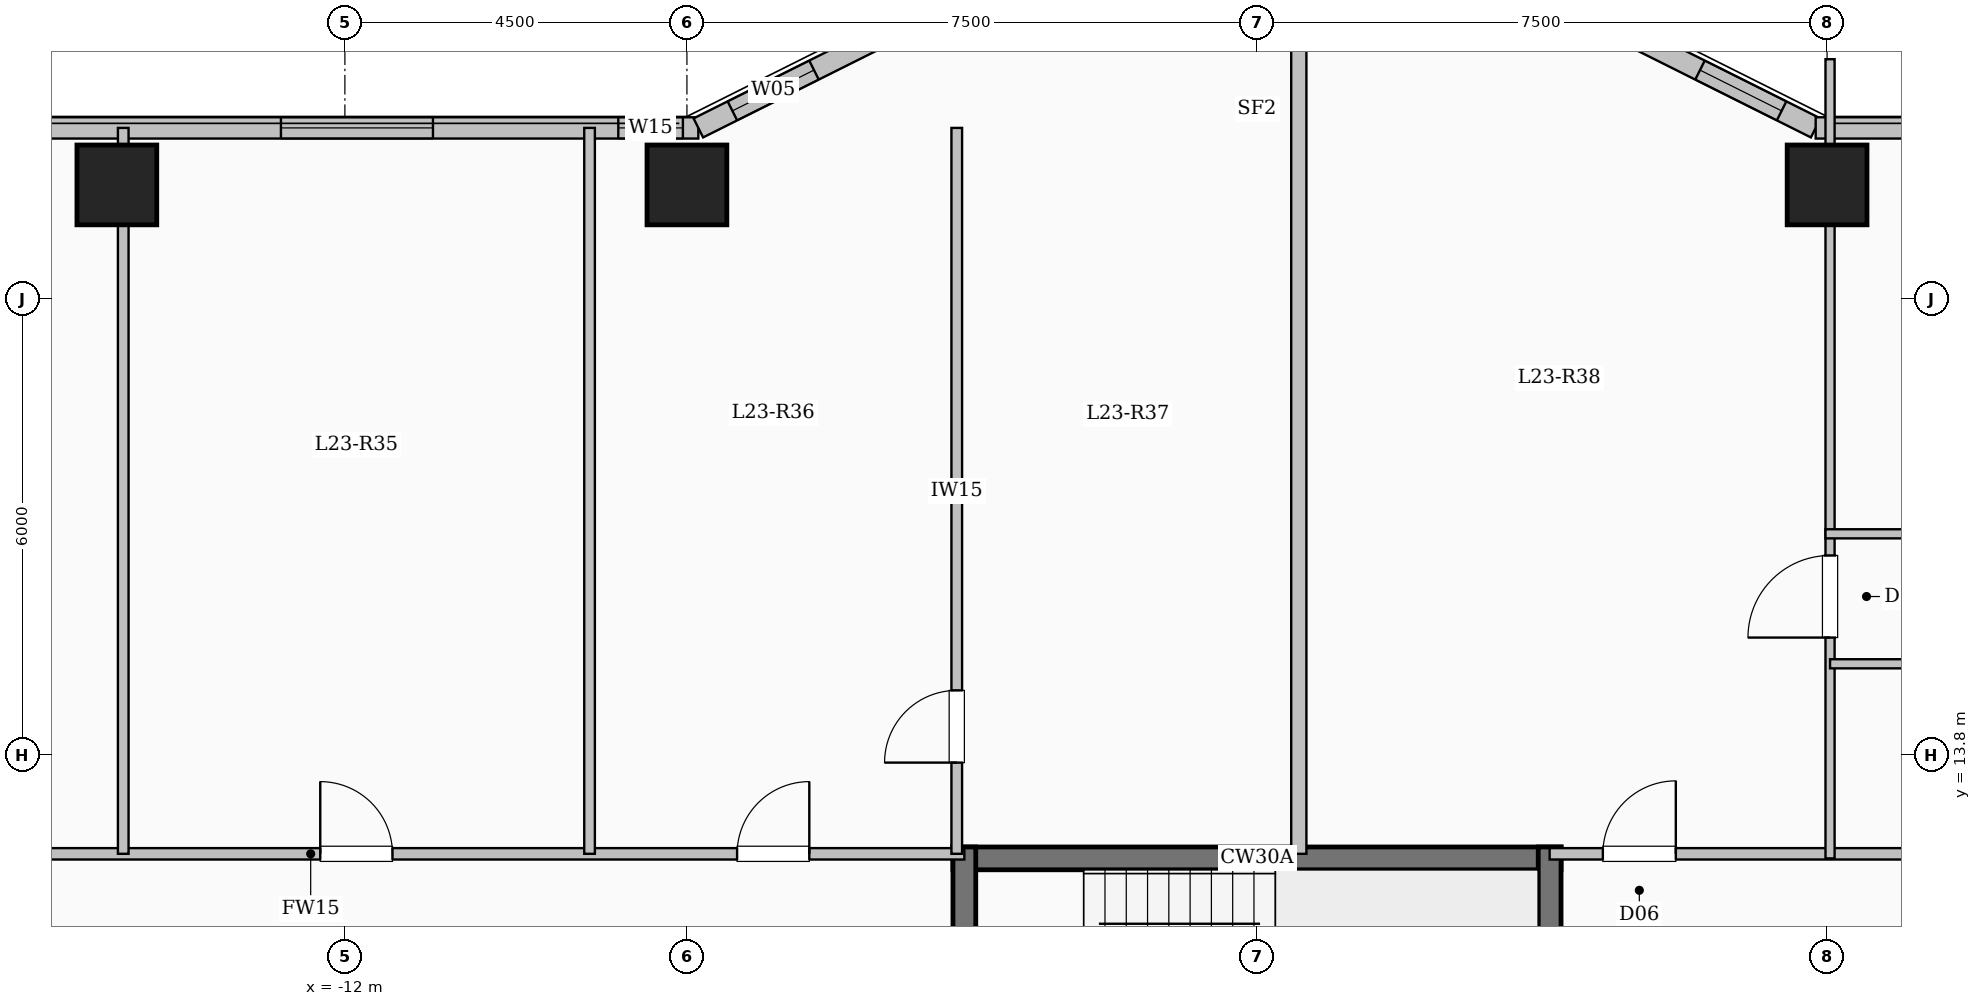
"""IFC4 building model, lengths in metres.
Left out: names, types, materials, properties, quantities, classifications, styles, units other than length and angle.
Written with IfcOpenShell. Run it as: python <this file> out.ifc"""

import sys

from ifc_helpers import new_model, si_unit, direction, frame, frame_2d, origin, origin_2d, place, context, subcontext, project, spatial, rectangle, extrude, element, fill, save


model = new_model("IFC4")
c1 = context("Model", 3, precision=1e-05, world=origin(), true_north=direction((0.0, 1.0)))
c2 = subcontext(c1, "Body", "Model", "MODEL_VIEW")
j1 = project(units=[si_unit("LENGTHUNIT", "METRE"), si_unit("PLANEANGLEUNIT", "RADIAN")], contexts=[c1])
p1 = place(None, origin())
s1 = spatial("IfcSite", under=j1, at=p1, CompositionType="ELEMENT")
p2 = place(p1, origin())
s2 = spatial("IfcBuilding", under=s1, at=p2, CompositionType="ELEMENT")
p3 = place(p2, frame((0.0, 0.0, 88.35)))
s3 = spatial("IfcBuildingStorey", under=s2, at=p3, CompositionType="ELEMENT", Elevation=88.35)
for number, where, z_axis, x_axis in (
    (1, (-15.0, 21.3, 0.0), (0.0, 0.0, 1.0), (1.0, 0.0, 0.0)),
    (2, (-7.5, 21.3, 0.0), (0.0, 0.0, 1.0), (1.0, 0.0, 0.0)),
    (3, (7.5, 21.3, 0.0), (0.0, 0.0, 1.0), (1.0, 0.0, 0.0)),
):
    element("IfcColumn", number, at=place(p3, frame(where, z_axis=z_axis, x_axis=x_axis)), inside=s3, PredefinedType="COLUMN", context=c2, shape_type="SweptSolid", body=[
        extrude(rectangle(XDim=1.05, YDim=1.05, at=origin_2d()), origin(), (0.0, 0.0, 1.0), 3.35),
    ])
p4 = place(p3, frame((-21.15, 22.05, 0.0), z_axis=(0.0, 0.0, 1.0), x_axis=(1.0, 0.0, 0.0)))
e4 = element("IfcWall", 4, at=p4, inside=s3, PredefinedType="SOLIDWALL", context=c2, shape_type="SweptSolid", body=[
    extrude(rectangle(XDim=13.8, YDim=0.28, at=frame_2d((6.9, 0.0))), origin(), (0.0, 0.0, 1.0), 3.1),
])
p5 = place(p4, frame((2.136, 0.0, 0.9)))
e5 = element("IfcOpeningElement", 5, at=p5, cuts=e4, PredefinedType="OPENING", context=c2, shape_type="SweptSolid", body=[
    extrude(rectangle(XDim=2.0, YDim=1.7, at=frame_2d((1.0, 0.85))), frame((0.0, 0.15, 0.0), z_axis=(0.0, -1.0, 0.0), x_axis=(1.0, 0.0, 0.0)), (0.0, 0.0, 1.0), 0.3),
])
p6 = place(p4, frame((8.309, 0.0, 0.9)))
e6 = element("IfcOpeningElement", 6, at=p6, cuts=e4, PredefinedType="OPENING", context=c2, shape_type="SweptSolid", body=[
    extrude(rectangle(XDim=2.0, YDim=1.7, at=frame_2d((1.0, 0.85))), frame((0.0, 0.15, 0.0), z_axis=(0.0, -1.0, 0.0), x_axis=(1.0, 0.0, 0.0)), (0.0, 0.0, 1.0), 0.3),
])
p7 = place(p4, frame((12.747, 0.0, 0.95)))
e7 = element("IfcOpeningElement", 7, at=p7, cuts=e4, PredefinedType="OPENING", context=c2, shape_type="SweptSolid", body=[
    extrude(rectangle(XDim=0.85, YDim=1.5, at=frame_2d((0.425, 0.75))), frame((0.0, 0.15, 0.0), z_axis=(0.0, -1.0, 0.0), x_axis=(1.0, 0.0, 0.0)), (0.0, 0.0, 1.0), 0.3),
])
p8 = place(p3, frame((-7.35, 22.05, 0.0), z_axis=(0.0, 0.0, 1.0), x_axis=(0.894427191, 0.4472135955, 0.0)))
e8 = element("IfcWall", 8, at=p8, inside=s3, PredefinedType="SOLIDWALL", context=c2, shape_type="SweptSolid", body=[
    extrude(rectangle(XDim=3.354, YDim=0.28, at=frame_2d((1.677, 0.0))), origin(), (0.0, 0.0, 1.0), 3.1),
])
p9 = place(p8, frame((0.501, 0.0, 0.95)))
e9 = element("IfcOpeningElement", 9, at=p9, cuts=e8, PredefinedType="OPENING", context=c2, shape_type="SweptSolid", body=[
    extrude(rectangle(XDim=1.2, YDim=1.5, at=frame_2d((0.6, 0.75))), frame((0.0, 0.15, 0.0), z_axis=(0.0, -1.0, 0.0), x_axis=(1.0, 0.0, 0.0)), (0.0, 0.0, 1.0), 0.3),
])
p10 = place(p3, frame((4.35, 23.55, 0.0), z_axis=(0.0, 0.0, 1.0), x_axis=(0.894427191, -0.4472135955, 0.0)))
e10 = element("IfcWall", 10, at=p10, inside=s3, PredefinedType="SOLIDWALL", context=c2, shape_type="SweptSolid", body=[
    extrude(rectangle(XDim=3.354, YDim=0.28, at=frame_2d((1.677, 0.0))), origin(), (0.0, 0.0, 1.0), 3.1),
])
p11 = place(p10, frame((1.653, 0.0, 0.95)))
e11 = element("IfcOpeningElement", 11, at=p11, cuts=e10, PredefinedType="OPENING", context=c2, shape_type="SweptSolid", body=[
    extrude(rectangle(XDim=1.2, YDim=1.5, at=frame_2d((0.6, 0.75))), frame((0.0, 0.15, 0.0), z_axis=(0.0, -1.0, 0.0), x_axis=(1.0, 0.0, 0.0)), (0.0, 0.0, 1.0), 0.3),
])
p12 = place(p3, frame((7.35, 22.05, 0.0), z_axis=(0.0, 0.0, 1.0), x_axis=(1.0, 0.0, 0.0)))
e12 = element("IfcWall", 12, at=p12, inside=s3, PredefinedType="SOLIDWALL", context=c2, shape_type="SweptSolid", body=[
    extrude(rectangle(XDim=13.8, YDim=0.28, at=frame_2d((6.9, 0.0))), origin(), (0.0, 0.0, 1.0), 3.1),
])
p13 = place(p12, frame((1.534, 0.0, 0.9)))
e13 = element("IfcOpeningElement", 13, at=p13, cuts=e12, PredefinedType="OPENING", context=c2, shape_type="SweptSolid", body=[
    extrude(rectangle(XDim=1.8, YDim=1.65, at=frame_2d((0.9, 0.825))), frame((0.0, 0.15, 0.0), z_axis=(0.0, -1.0, 0.0), x_axis=(1.0, 0.0, 0.0)), (0.0, 0.0, 1.0), 0.3),
])
p14 = place(p12, frame((6.025, 0.0, 0.9)))
e14 = element("IfcOpeningElement", 14, at=p14, cuts=e12, PredefinedType="OPENING", context=c2, shape_type="SweptSolid", body=[
    extrude(rectangle(XDim=1.8, YDim=1.65, at=frame_2d((0.9, 0.825))), frame((0.0, 0.15, 0.0), z_axis=(0.0, -1.0, 0.0), x_axis=(1.0, 0.0, 0.0)), (0.0, 0.0, 1.0), 0.3),
])
p15 = place(p12, frame((10.542, 0.0, 0.9)))
e15 = element("IfcOpeningElement", 15, at=p15, cuts=e12, PredefinedType="OPENING", context=c2, shape_type="SweptSolid", body=[
    extrude(rectangle(XDim=1.8, YDim=1.65, at=frame_2d((0.9, 0.825))), frame((0.0, 0.15, 0.0), z_axis=(0.0, -1.0, 0.0), x_axis=(1.0, 0.0, 0.0)), (0.0, 0.0, 1.0), 0.3),
])
p16 = place(p3, frame((-4.0, 12.44, 0.0), z_axis=(0.0, 0.0, 1.0), x_axis=(1.0, 0.0, 0.0)))
e16 = element("IfcWall", 16, at=p16, inside=s3, PredefinedType="SHEAR", context=c2, shape_type="SweptSolid", body=[
    extrude(rectangle(XDim=8.0, YDim=0.3, at=frame_2d((4.0, 0.0))), origin(), (0.0, 0.0, 1.0), 3.35),
])
for number, where, z_axis, x_axis in (
    (17, (-3.85, 9.0, 0.0), (0.0, 0.0, 1.0), (0.0, 1.0, 0.0)),
    (18, (3.85, 9.0, 0.0), (0.0, 0.0, 1.0), (0.0, 1.0, 0.0)),
):
    element("IfcWall", number, at=place(p3, frame(where, z_axis=z_axis, x_axis=x_axis)), inside=s3, PredefinedType="SHEAR", context=c2, shape_type="SweptSolid", body=[
        extrude(rectangle(XDim=3.59, YDim=0.3, at=frame_2d((1.795, 0.0))), origin(), (0.0, 0.0, 1.0), 3.35),
    ])
p17 = place(p3, frame((-21.05, 12.5, 0.0), z_axis=(0.0, 0.0, 1.0), x_axis=(1.0, 0.0, 0.0)))
e19 = element("IfcWall", 19, at=p17, inside=s3, PredefinedType="PARTITIONING", context=c2, shape_type="SweptSolid", body=[
    extrude(rectangle(XDim=17.2, YDim=0.15, at=frame_2d((8.6, 0.0))), origin(), (0.0, 0.0, 1.0), 3.1),
])
p18 = place(p17, frame((2.562, 0.0, 0.0)))
e20 = element("IfcOpeningElement", 20, at=p18, cuts=e19, PredefinedType="OPENING", context=c2, shape_type="SweptSolid", body=[
    extrude(rectangle(XDim=0.95, YDim=2.15, at=frame_2d((0.475, 1.075))), frame((0.0, 0.085, 0.0), z_axis=(0.0, -1.0, 0.0), x_axis=(1.0, 0.0, 0.0)), (0.0, 0.0, 1.0), 0.17),
])
p19 = place(p17, frame((8.726, 0.0, 0.0)))
e21 = element("IfcOpeningElement", 21, at=p19, cuts=e19, PredefinedType="OPENING", context=c2, shape_type="SweptSolid", body=[
    extrude(rectangle(XDim=0.95, YDim=2.15, at=frame_2d((0.475, 1.075))), frame((0.0, 0.085, 0.0), z_axis=(0.0, -1.0, 0.0), x_axis=(1.0, 0.0, 0.0)), (0.0, 0.0, 1.0), 0.17),
])
p20 = place(p17, frame((14.21, 0.0, 0.0)))
e22 = element("IfcOpeningElement", 22, at=p20, cuts=e19, PredefinedType="OPENING", context=c2, shape_type="SweptSolid", body=[
    extrude(rectangle(XDim=0.95, YDim=2.15, at=frame_2d((0.475, 1.075))), frame((0.0, 0.085, 0.0), z_axis=(0.0, -1.0, 0.0), x_axis=(1.0, 0.0, 0.0)), (0.0, 0.0, 1.0), 0.17),
])
p21 = place(p3, frame((3.85, 12.5, 0.0), z_axis=(0.0, 0.0, 1.0), x_axis=(1.0, 0.0, 0.0)))
e23 = element("IfcWall", 23, at=p21, inside=s3, PredefinedType="PARTITIONING", context=c2, shape_type="SweptSolid", body=[
    extrude(rectangle(XDim=17.2, YDim=0.15, at=frame_2d((8.6, 0.0))), origin(), (0.0, 0.0, 1.0), 3.1),
])
p22 = place(p21, frame((0.7, 0.0, 0.0)))
e24 = element("IfcOpeningElement", 24, at=p22, cuts=e23, PredefinedType="OPENING", context=c2, shape_type="SweptSolid", body=[
    extrude(rectangle(XDim=0.96, YDim=2.15, at=frame_2d((0.48, 1.075))), frame((0.0, 0.085, 0.0), z_axis=(0.0, -1.0, 0.0), x_axis=(1.0, 0.0, 0.0)), (0.0, 0.0, 1.0), 0.17),
])
p23 = place(p3, frame((0.55, 12.5, 0.0), z_axis=(0.0, 0.0, 1.0), x_axis=(0.0, 1.0, 0.0)))
e25 = element("IfcWall", 25, at=p23, inside=s3, PredefinedType="SOLIDWALL", context=c2, shape_type="SweptSolid", body=[
    extrude(rectangle(XDim=11.08, YDim=0.2, at=frame_2d((5.54, 0.0))), origin(), (0.0, 0.0, 1.0), 3.1),
])
p24 = place(p3, frame((-3.95, 12.5, 0.0), z_axis=(0.0, 0.0, 1.0), x_axis=(0.0, 1.0, 0.0)))
e26 = element("IfcWall", 26, at=p24, inside=s3, PredefinedType="PARTITIONING", context=c2, shape_type="SweptSolid", body=[
    extrude(rectangle(XDim=9.55, YDim=0.14, at=frame_2d((4.775, 0.0))), origin(), (0.0, 0.0, 1.0), 3.1),
])
p25 = place(p24, frame((1.2, 0.0, 0.0)))
e27 = element("IfcOpeningElement", 27, at=p25, cuts=e26, PredefinedType="OPENING", context=c2, shape_type="SweptSolid", body=[
    extrude(rectangle(XDim=0.95, YDim=2.15, at=frame_2d((0.475, 1.075))), frame((0.0, 0.08, 0.0), z_axis=(0.0, -1.0, 0.0), x_axis=(1.0, 0.0, 0.0)), (0.0, 0.0, 1.0), 0.16),
])
p26 = place(p3, frame((-14.916, 12.5, 0.0), z_axis=(0.0, 0.0, 1.0), x_axis=(0.0, 1.0, 0.0)))
e28 = element("IfcWall", 28, at=p26, inside=s3, PredefinedType="PARTITIONING", context=c2, shape_type="SweptSolid", body=[
    extrude(rectangle(XDim=9.55, YDim=0.14, at=frame_2d((4.775, 0.0))), origin(), (0.0, 0.0, 1.0), 2.435),
])
p27 = place(p3, frame((-8.781, 12.5, 0.0), z_axis=(0.0, 0.0, 1.0), x_axis=(0.0, 1.0, 0.0)))
e29 = element("IfcWall", 29, at=p27, inside=s3, PredefinedType="PARTITIONING", context=c2, shape_type="SweptSolid", body=[
    extrude(rectangle(XDim=9.55, YDim=0.14, at=frame_2d((4.775, 0.0))), origin(), (0.0, 0.0, 1.0), 3.1),
])
p28 = place(p3, frame((7.539, 12.44, 0.0), z_axis=(0.0, 0.0, 1.0), x_axis=(0.0, 1.0, 0.0)))
e30 = element("IfcWall", 30, at=p28, inside=s3, PredefinedType="PARTITIONING", context=c2, shape_type="SweptSolid", body=[
    extrude(rectangle(XDim=10.514, YDim=0.12, at=frame_2d((5.257, 0.0))), origin(), (0.0, 0.0, 1.0), 2.435),
])
p29 = place(p28, frame((2.905, 0.0, 0.0)))
e31 = element("IfcOpeningElement", 31, at=p29, cuts=e30, PredefinedType="OPENING", context=c2, shape_type="SweptSolid", body=[
    extrude(rectangle(XDim=1.08, YDim=2.15, at=frame_2d((0.54, 1.075))), frame((0.0, 0.07, 0.0), z_axis=(0.0, -1.0, 0.0), x_axis=(1.0, 0.0, 0.0)), (0.0, 0.0, 1.0), 0.14),
])
p30 = place(p3, frame((7.539, 15.0, 0.0), z_axis=(0.0, 0.0, 1.0), x_axis=(1.0, 0.0, 0.0)))
e32 = element("IfcWall", 32, at=p30, inside=s3, PredefinedType="PARTITIONING", context=c2, shape_type="SweptSolid", body=[
    extrude(rectangle(XDim=7.129, YDim=0.12, at=frame_2d((3.564, 0.0))), origin(), (0.0, 0.0, 1.0), 3.1),
])
p31 = place(p30, frame((3.124, 0.0, 0.0)))
e33 = element("IfcOpeningElement", 33, at=p31, cuts=e32, PredefinedType="OPENING", context=c2, shape_type="SweptSolid", body=[
    extrude(rectangle(XDim=0.88, YDim=2.1, at=frame_2d((0.44, 1.05))), frame((0.0, 0.07, 0.0), z_axis=(0.0, -1.0, 0.0), x_axis=(1.0, 0.0, 0.0)), (0.0, 0.0, 1.0), 0.14),
])
p32 = place(p3, frame((7.479, 16.71, 0.0), z_axis=(0.0, 0.0, 1.0), x_axis=(1.0, 0.0, 0.0)))
e34 = element("IfcWall", 34, at=p32, inside=s3, PredefinedType="PARTITIONING", context=c2, shape_type="SweptSolid", body=[
    extrude(rectangle(XDim=13.631, YDim=0.12, at=frame_2d((6.815, 0.0))), origin(), (0.0, 0.0, 1.0), 3.1),
])
p33 = place(p32, frame((1.802, 0.0, 0.0)))
e35 = element("IfcOpeningElement", 35, at=p33, cuts=e34, PredefinedType="OPENING", context=c2, shape_type="SweptSolid", body=[
    extrude(rectangle(XDim=0.88, YDim=2.1, at=frame_2d((0.44, 1.05))), frame((0.0, 0.07, 0.0), z_axis=(0.0, -1.0, 0.0), x_axis=(1.0, 0.0, 0.0)), (0.0, 0.0, 1.0), 0.14),
])
p34 = place(p32, frame((6.286, 0.0, 0.0)))
e36 = element("IfcOpeningElement", 36, at=p34, cuts=e34, PredefinedType="OPENING", context=c2, shape_type="SweptSolid", body=[
    extrude(rectangle(XDim=0.88, YDim=2.1, at=frame_2d((0.44, 1.05))), frame((0.0, 0.07, 0.0), z_axis=(0.0, -1.0, 0.0), x_axis=(1.0, 0.0, 0.0)), (0.0, 0.0, 1.0), 0.14),
])
p35 = place(p32, frame((10.769, 0.0, 0.0)))
e37 = element("IfcOpeningElement", 37, at=p35, cuts=e34, PredefinedType="OPENING", context=c2, shape_type="SweptSolid", body=[
    extrude(rectangle(XDim=0.88, YDim=2.1, at=frame_2d((0.44, 1.05))), frame((0.0, 0.07, 0.0), z_axis=(0.0, -1.0, 0.0), x_axis=(1.0, 0.0, 0.0)), (0.0, 0.0, 1.0), 0.14),
])
p36 = place(p6, origin())
e38 = element("IfcWindow", 38, at=p36, inside=s3, PartitioningType="SINGLE_PANEL", PredefinedType="WINDOW", context=c2, shape_type="SweptSolid", body=[
    extrude(rectangle(XDim=2.0, YDim=1.7, at=frame_2d((1.0, 0.85))), frame((0.0, 0.03, 0.0), z_axis=(0.0, -1.0, 0.0), x_axis=(1.0, 0.0, 0.0)), (0.0, 0.0, 1.0), 0.06),
])
fill(e6, e38)
p37 = place(p7, origin())
e39 = element("IfcWindow", 39, at=p37, inside=s3, PartitioningType="SINGLE_PANEL", PredefinedType="WINDOW", context=c2, shape_type="SweptSolid", body=[
    extrude(rectangle(XDim=0.85, YDim=1.5, at=frame_2d((0.425, 0.75))), frame((0.0, 0.03, 0.0), z_axis=(0.0, -1.0, 0.0), x_axis=(1.0, 0.0, 0.0)), (0.0, 0.0, 1.0), 0.06),
])
fill(e7, e39)
p38 = place(p9, origin())
e40 = element("IfcWindow", 40, at=p38, inside=s3, PartitioningType="SINGLE_PANEL", PredefinedType="WINDOW", context=c2, shape_type="SweptSolid", body=[
    extrude(rectangle(XDim=1.2, YDim=1.5, at=frame_2d((0.6, 0.75))), frame((0.0, 0.03, 0.0), z_axis=(0.0, -1.0, 0.0), x_axis=(1.0, 0.0, 0.0)), (0.0, 0.0, 1.0), 0.06),
])
fill(e9, e40)
p39 = place(p11, origin())
e41 = element("IfcWindow", 41, at=p39, inside=s3, PartitioningType="SINGLE_PANEL", PredefinedType="WINDOW", context=c2, shape_type="SweptSolid", body=[
    extrude(rectangle(XDim=1.2, YDim=1.5, at=frame_2d((0.6, 0.75))), frame((0.0, 0.03, 0.0), z_axis=(0.0, -1.0, 0.0), x_axis=(1.0, 0.0, 0.0)), (0.0, 0.0, 1.0), 0.06),
])
fill(e11, e41)
p40 = place(p19, origin())
e42 = element("IfcDoor", 42, at=p40, inside=s3, OperationType="SINGLE_SWING_LEFT", PredefinedType="DOOR", context=c2, shape_type="SweptSolid", body=[
    extrude(rectangle(XDim=0.95, YDim=2.15, at=frame_2d((0.475, 1.075))), frame((0.0, 0.025, 0.0), z_axis=(0.0, -1.0, 0.0), x_axis=(1.0, 0.0, 0.0)), (0.0, 0.0, 1.0), 0.05),
])
fill(e21, e42)
p41 = place(p20, origin())
e43 = element("IfcDoor", 43, at=p41, inside=s3, OperationType="SINGLE_SWING_RIGHT", PredefinedType="DOOR", context=c2, shape_type="SweptSolid", body=[
    extrude(rectangle(XDim=0.95, YDim=2.15, at=frame_2d((0.475, 1.075))), frame((0.0, 0.025, 0.0), z_axis=(0.0, -1.0, 0.0), x_axis=(1.0, 0.0, 0.0)), (0.0, 0.0, 1.0), 0.05),
])
fill(e22, e43)
p42 = place(p25, origin())
e44 = element("IfcDoor", 44, at=p42, inside=s3, OperationType="SINGLE_SWING_LEFT", PredefinedType="DOOR", context=c2, shape_type="SweptSolid", body=[
    extrude(rectangle(XDim=0.95, YDim=2.15, at=frame_2d((0.475, 1.075))), frame((0.0, 0.025, 0.0), z_axis=(0.0, -1.0, 0.0), x_axis=(1.0, 0.0, 0.0)), (0.0, 0.0, 1.0), 0.05),
])
fill(e27, e44)
p43 = place(p22, origin())
e45 = element("IfcDoor", 45, at=p43, inside=s3, OperationType="SINGLE_SWING_RIGHT", PredefinedType="DOOR", context=c2, shape_type="SweptSolid", body=[
    extrude(rectangle(XDim=0.96, YDim=2.15, at=frame_2d((0.48, 1.075))), frame((0.0, 0.025, 0.0), z_axis=(0.0, -1.0, 0.0), x_axis=(1.0, 0.0, 0.0)), (0.0, 0.0, 1.0), 0.05),
])
fill(e24, e45)
p44 = place(p29, origin())
e46 = element("IfcDoor", 46, at=p44, inside=s3, OperationType="SINGLE_SWING_LEFT", PredefinedType="DOOR", context=c2, shape_type="SweptSolid", body=[
    extrude(rectangle(XDim=1.08, YDim=2.15, at=frame_2d((0.54, 1.075))), frame((0.0, 0.025, 0.0), z_axis=(0.0, -1.0, 0.0), x_axis=(1.0, 0.0, 0.0)), (0.0, 0.0, 1.0), 0.05),
])
fill(e31, e46)
save(model, sys.argv[1])
